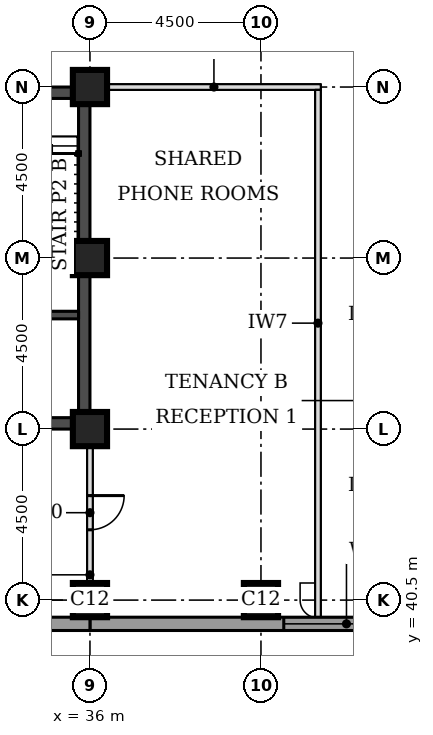
"""IFC4 building model, lengths in metres.
Left out: names, types, materials, properties, quantities, classifications, styles, units other than length and angle.
Written with IfcOpenShell. Run it as: python <this file> out.ifc"""

import sys

from ifc_helpers import new_model, si_unit, direction, frame, frame_2d, origin, origin_2d, place, context, subcontext, project, spatial, rectangle, extrude, element, fill, save


model = new_model("IFC4")
c1 = context("Model", 3, precision=1e-05, world=origin(), true_north=direction((0.0, 1.0)))
c2 = subcontext(c1, "Body", "Model", "MODEL_VIEW")
j1 = project(units=[si_unit("LENGTHUNIT", "METRE"), si_unit("PLANEANGLEUNIT", "RADIAN")], contexts=[c1])
p1 = place(None, origin())
s1 = spatial("IfcSite", under=j1, at=p1, CompositionType="ELEMENT")
p2 = place(p1, origin())
s2 = spatial("IfcBuilding", under=s1, at=p2, CompositionType="ELEMENT")
p3 = place(p2, frame((0.0, 0.0, 166.2)))
s3 = spatial("IfcBuildingStorey", under=s2, at=p3, CompositionType="ELEMENT", Elevation=166.2)
for number, where, z_axis, x_axis in (
    (1, (36.0, 40.5, 0.0), (0.0, 0.0, 1.0), (1.0, 0.0, 0.0)),
    (2, (40.5, 40.5, 0.0), (0.0, 0.0, 1.0), (1.0, 0.0, 0.0)),
    (3, (36.0, 45.0, 0.0), (0.0, 0.0, 1.0), (1.0, 0.0, 0.0)),
    (4, (36.0, 49.5, 0.0), (0.0, 0.0, 1.0), (1.0, 0.0, 0.0)),
    (5, (36.0, 54.0, 0.0), (0.0, 0.0, 1.0), (1.0, 0.0, 0.0)),
):
    element("IfcColumn", number, at=place(p3, frame(where, z_axis=z_axis, x_axis=x_axis)), inside=s3, PredefinedType="COLUMN", context=c2, shape_type="SweptSolid", body=[
        extrude(rectangle(XDim=0.9, YDim=0.9, at=origin_2d()), origin(), (0.0, 0.0, 1.0), 3.7),
    ])
p4 = place(p3, frame((27.3, 45.15, 0.0), z_axis=(0.0, 0.0, 1.0), x_axis=(1.0, 0.0, 0.0)))
e6 = element("IfcWall", 6, at=p4, inside=s3, PredefinedType="SHEAR", context=c2, shape_type="SweptSolid", body=[
    extrude(rectangle(XDim=8.4, YDim=0.3, at=frame_2d((4.2, 0.0))), origin(), (0.0, 0.0, 1.0), 3.7),
])
p5 = place(p4, frame((5.2, 0.0, 0.0)))
e7 = element("IfcOpeningElement", 7, at=p5, cuts=e6, PredefinedType="OPENING", context=c2, shape_type="SweptSolid", body=[
    extrude(rectangle(XDim=1.0, YDim=2.1, at=frame_2d((0.5, 1.05))), frame((0.0, 0.16, 0.0), z_axis=(0.0, -1.0, 0.0), x_axis=(1.0, 0.0, 0.0)), (0.0, 0.0, 1.0), 0.32),
])
p6 = place(p3, frame((27.3, 53.85, 0.0), z_axis=(0.0, 0.0, 1.0), x_axis=(1.0, 0.0, 0.0)))
e8 = element("IfcWall", 8, at=p6, inside=s3, PredefinedType="SHEAR", context=c2, shape_type="SweptSolid", body=[
    extrude(rectangle(XDim=8.4, YDim=0.3, at=frame_2d((4.2, 0.0))), origin(), (0.0, 0.0, 1.0), 3.7),
])
p7 = place(p6, frame((6.4, 0.0, 0.0)))
e9 = element("IfcOpeningElement", 9, at=p7, cuts=e8, PredefinedType="OPENING", context=c2, shape_type="SweptSolid", body=[
    extrude(rectangle(XDim=1.1, YDim=2.1, at=frame_2d((0.55, 1.05))), frame((0.0, 0.16, 0.0), z_axis=(0.0, -1.0, 0.0), x_axis=(1.0, 0.0, 0.0)), (0.0, 0.0, 1.0), 0.32),
])
p8 = place(p3, frame((35.85, 45.0, 0.0), z_axis=(0.0, 0.0, 1.0), x_axis=(0.0, 1.0, 0.0)))
e10 = element("IfcWall", 10, at=p8, inside=s3, PredefinedType="SHEAR", context=c2, shape_type="SweptSolid", body=[
    extrude(rectangle(XDim=9.0, YDim=0.3, at=frame_2d((4.5, 0.0))), origin(), (0.0, 0.0, 1.0), 3.7),
])
p9 = place(p3, frame((36.0, 39.875, 0.0), z_axis=(0.0, 0.0, 1.0), x_axis=(1.0, 0.0, 0.0)))
e11 = element("IfcWall", 11, at=p9, inside=s3, PredefinedType="STANDARD", context=c2, shape_type="SweptSolid", body=[
    extrude(rectangle(XDim=36.331, YDim=0.35, at=frame_2d((18.166, 0.0))), origin(), (0.0, 0.0, 1.0), 3.525),
])
p10 = place(p9, frame((5.1, 0.0, 0.9)))
e12 = element("IfcOpeningElement", 12, at=p10, cuts=e11, PredefinedType="OPENING", context=c2, shape_type="SweptSolid", body=[
    extrude(rectangle(XDim=3.3, YDim=1.9, at=frame_2d((1.65, 0.95))), frame((0.0, 0.185, 0.0), z_axis=(0.0, -1.0, 0.0), x_axis=(1.0, 0.0, 0.0)), (0.0, 0.0, 1.0), 0.37),
])
p11 = place(p9, frame((9.6, 0.0, 0.9)))
e13 = element("IfcOpeningElement", 13, at=p11, cuts=e11, PredefinedType="OPENING", context=c2, shape_type="SweptSolid", body=[
    extrude(rectangle(XDim=3.3, YDim=1.9, at=frame_2d((1.65, 0.95))), frame((0.0, 0.185, 0.0), z_axis=(0.0, -1.0, 0.0), x_axis=(1.0, 0.0, 0.0)), (0.0, 0.0, 1.0), 0.37),
])
p12 = place(p9, frame((14.1, 0.0, 0.9)))
e14 = element("IfcOpeningElement", 14, at=p12, cuts=e11, PredefinedType="OPENING", context=c2, shape_type="SweptSolid", body=[
    extrude(rectangle(XDim=3.3, YDim=1.9, at=frame_2d((1.65, 0.95))), frame((0.0, 0.185, 0.0), z_axis=(0.0, -1.0, 0.0), x_axis=(1.0, 0.0, 0.0)), (0.0, 0.0, 1.0), 0.37),
])
p13 = place(p9, frame((18.6, 0.0, 0.9)))
e15 = element("IfcOpeningElement", 15, at=p13, cuts=e11, PredefinedType="OPENING", context=c2, shape_type="SweptSolid", body=[
    extrude(rectangle(XDim=3.3, YDim=1.9, at=frame_2d((1.65, 0.95))), frame((0.0, 0.185, 0.0), z_axis=(0.0, -1.0, 0.0), x_axis=(1.0, 0.0, 0.0)), (0.0, 0.0, 1.0), 0.37),
])
p14 = place(p9, frame((23.1, 0.0, 0.9)))
e16 = element("IfcOpeningElement", 16, at=p14, cuts=e11, PredefinedType="OPENING", context=c2, shape_type="SweptSolid", body=[
    extrude(rectangle(XDim=3.3, YDim=1.9, at=frame_2d((1.65, 0.95))), frame((0.0, 0.185, 0.0), z_axis=(0.0, -1.0, 0.0), x_axis=(1.0, 0.0, 0.0)), (0.0, 0.0, 1.0), 0.37),
])
p15 = place(p9, frame((27.6, 0.0, 0.9)))
e17 = element("IfcOpeningElement", 17, at=p15, cuts=e11, PredefinedType="OPENING", context=c2, shape_type="SweptSolid", body=[
    extrude(rectangle(XDim=3.3, YDim=1.9, at=frame_2d((1.65, 0.95))), frame((0.0, 0.185, 0.0), z_axis=(0.0, -1.0, 0.0), x_axis=(1.0, 0.0, 0.0)), (0.0, 0.0, 1.0), 0.37),
])
p16 = place(p3, frame((17.669, 39.875, 0.0), z_axis=(0.0, 0.0, 1.0), x_axis=(1.0, 0.0, 0.0)))
e18 = element("IfcWall", 18, at=p16, inside=s3, PredefinedType="STANDARD", context=c2, shape_type="SweptSolid", body=[
    extrude(rectangle(XDim=18.331, YDim=0.35, at=frame_2d((9.166, 0.0))), origin(), (0.0, 0.0, 1.0), 3.525),
])
p17 = place(p16, frame((5.431, 0.0, 0.9)))
e19 = element("IfcOpeningElement", 19, at=p17, cuts=e18, PredefinedType="OPENING", context=c2, shape_type="SweptSolid", body=[
    extrude(rectangle(XDim=3.3, YDim=1.9, at=frame_2d((1.65, 0.95))), frame((0.0, 0.185, 0.0), z_axis=(0.0, -1.0, 0.0), x_axis=(1.0, 0.0, 0.0)), (0.0, 0.0, 1.0), 0.37),
])
p18 = place(p16, frame((9.931, 0.0, 0.9)))
e20 = element("IfcOpeningElement", 20, at=p18, cuts=e18, PredefinedType="OPENING", context=c2, shape_type="SweptSolid", body=[
    extrude(rectangle(XDim=3.3, YDim=1.9, at=frame_2d((1.65, 0.95))), frame((0.0, 0.185, 0.0), z_axis=(0.0, -1.0, 0.0), x_axis=(1.0, 0.0, 0.0)), (0.0, 0.0, 1.0), 0.37),
])
p19 = place(p3, frame((36.45, 54.0, 0.0), z_axis=(0.0, 0.0, 1.0), x_axis=(1.0, 0.0, 0.0)))
e21 = element("IfcWall", 21, at=p19, inside=s3, PredefinedType="PARTITIONING", context=c2, shape_type="SweptSolid", body=[
    extrude(rectangle(XDim=5.625, YDim=0.15, at=frame_2d((2.812, 0.0))), origin(), (0.0, 0.0, 1.0), 3.55),
])
p20 = place(p3, frame((42.0, 40.05, 0.0), z_axis=(0.0, 0.0, 1.0), x_axis=(0.0, 1.0, 0.0)))
e22 = element("IfcWall", 22, at=p20, inside=s3, PredefinedType="PARTITIONING", context=c2, shape_type="SweptSolid", body=[
    extrude(rectangle(XDim=13.875, YDim=0.15, at=frame_2d((6.938, 0.0))), origin(), (0.0, 0.0, 1.0), 3.55),
])
p21 = place(p3, frame((36.0, 40.95, 0.0), z_axis=(0.0, 0.0, 1.0), x_axis=(0.0, 1.0, 0.0)))
e23 = element("IfcWall", 23, at=p21, inside=s3, PredefinedType="PARTITIONING", context=c2, shape_type="SweptSolid", body=[
    extrude(rectangle(XDim=3.63, YDim=0.15, at=frame_2d((1.815, 0.0))), origin(), (0.0, 0.0, 1.0), 2.8),
])
p22 = place(p21, frame((1.4, 0.0, 0.0)))
e24 = element("IfcOpeningElement", 24, at=p22, cuts=e23, PredefinedType="OPENING", context=c2, shape_type="SweptSolid", body=[
    extrude(rectangle(XDim=0.9, YDim=2.1, at=frame_2d((0.45, 1.05))), frame((0.0, 0.085, 0.0), z_axis=(0.0, -1.0, 0.0), x_axis=(1.0, 0.0, 0.0)), (0.0, 0.0, 1.0), 0.17),
])
p23 = place(p3, frame((32.7, 48.0, 0.0), z_axis=(0.0, 0.0, 1.0), x_axis=(1.0, 0.0, 0.0)))
e25 = element("IfcWall", 25, at=p23, inside=s3, PredefinedType="SOLIDWALL", context=c2, shape_type="SweptSolid", body=[
    extrude(rectangle(XDim=3.0, YDim=0.2, at=frame_2d((1.5, 0.0))), origin(), (0.0, 0.0, 1.0), 3.55),
])
p24 = place(p10, origin())
e26 = element("IfcWindow", 26, at=p24, inside=s3, PartitioningType="SINGLE_PANEL", PredefinedType="WINDOW", context=c2, shape_type="SweptSolid", body=[
    extrude(rectangle(XDim=3.3, YDim=1.9, at=frame_2d((1.65, 0.95))), frame((0.0, 0.085, 0.0), z_axis=(0.0, -1.0, 0.0), x_axis=(1.0, 0.0, 0.0)), (0.0, 0.0, 1.0), 0.06),
])
fill(e12, e26)
p25 = place(p22, frame((0.9, 0.0, 0.0), z_axis=(0.0, 0.0, 1.0), x_axis=(-1.0, 0.0, 0.0)))
e27 = element("IfcDoor", 27, at=p25, inside=s3, OperationType="SINGLE_SWING_LEFT", PredefinedType="DOOR", context=c2, shape_type="SweptSolid", body=[
    extrude(rectangle(XDim=0.9, YDim=2.1, at=frame_2d((0.45, 1.05))), frame((0.0, 0.025, 0.0), z_axis=(0.0, -1.0, 0.0), x_axis=(1.0, 0.0, 0.0)), (0.0, 0.0, 1.0), 0.05),
])
fill(e24, e27)
save(model, sys.argv[1])
